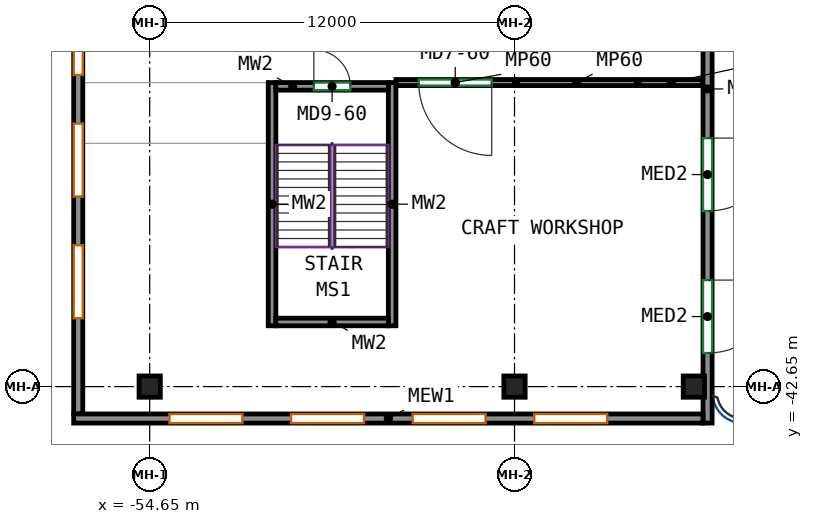
"""IFC4 building model, lengths in metres.
Left out: names, types, materials, properties, quantities, classifications, styles, units other than length and angle.
Written with IfcOpenShell. Run it as: python <this file> out.ifc"""

import sys

from ifc_helpers import new_model, si_unit, direction, frame, frame_2d, origin, origin_2d, place, context, subcontext, project, spatial, rectangle, extrude, source, transform, mapped, element, fill, save


model = new_model("IFC4")
c1 = context("Model", 3, precision=1e-05, world=origin(), true_north=direction((0.0, 1.0)))
c2 = subcontext(c1, "Body", "Model", "MODEL_VIEW")
j1 = project(units=[si_unit("LENGTHUNIT", "METRE"), si_unit("PLANEANGLEUNIT", "RADIAN")], contexts=[c1])
p1 = place(None, origin())
s1 = spatial("IfcSite", under=j1, at=p1, CompositionType="ELEMENT")
p2 = place(p1, origin())
s2 = spatial("IfcBuilding", under=s1, at=p2, CompositionType="ELEMENT")
p3 = place(p2, frame((0.0, 0.0, 18.0)))
s3 = spatial("IfcBuildingStorey", under=s2, at=p3, CompositionType="ELEMENT", Elevation=18.0)
m1 = source(origin(), c2, "Body", "SweptSolid", [
    extrude(rectangle(XDim=0.7, YDim=0.7, at=origin_2d()), origin(), (0.0, 0.0, 1.0), 4.1),
])
for number, where, z_axis, x_axis in (
    (1, (-54.65, -42.65, 0.0), (0.0, 0.0, 1.0), (1.0, 0.0, 0.0)),
    (2, (-42.65, -42.65, 0.0), (0.0, 0.0, 1.0), (1.0, 0.0, 0.0)),
    (3, (-36.75, -42.65, 0.0), (0.0, 0.0, 1.0), (1.0, 0.0, 0.0)),
):
    element("IfcColumn", number, at=place(p3, frame(where, z_axis=z_axis, x_axis=x_axis)), inside=s3, PredefinedType="COLUMN", context=c2, shape_type="MappedRepresentation", body=[
        mapped(m1, transform((0.0, 0.0, 0.0))),
    ])
m2 = source(origin(), c2, "Body", "SweptSolid", [
    extrude(rectangle(XDim=8.0, YDim=0.25, at=frame_2d((4.0, 0.0))), origin(), (0.0, 0.0, 1.0), 4.1),
])
for number, where, z_axis, x_axis in (
    (4, (-50.625, -40.65, 0.0), (0.0, 0.0, 1.0), (0.0, 1.0, 0.0)),
    (5, (-46.675, -40.65, 0.0), (0.0, 0.0, 1.0), (0.0, 1.0, 0.0)),
):
    element("IfcWall", number, at=place(p3, frame(where, z_axis=z_axis, x_axis=x_axis)), inside=s3, PredefinedType="SHEAR", context=c2, shape_type="MappedRepresentation", body=[
        mapped(m2, transform((0.0, 0.0, 0.0))),
    ])
m3 = source(origin(), c2, "Body", "SweptSolid", [
    extrude(rectangle(XDim=3.7, YDim=0.25, at=frame_2d((1.85, 0.0))), origin(), (0.0, 0.0, 1.0), 4.1),
])
p4 = place(p3, frame((-50.5, -40.525, 0.0), z_axis=(0.0, 0.0, 1.0), x_axis=(1.0, 0.0, 0.0)))
e6 = element("IfcWall", 6, at=p4, inside=s3, PredefinedType="SHEAR", context=c2, shape_type="MappedRepresentation", body=[
    mapped(m3, transform((0.0, 0.0, 0.0))),
])
p5 = place(p3, frame((-50.5, -32.775, 0.0), z_axis=(0.0, 0.0, 1.0), x_axis=(1.0, 0.0, 0.0)))
e7 = element("IfcWall", 7, at=p5, inside=s3, PredefinedType="SHEAR", context=c2, shape_type="MappedRepresentation", body=[
    mapped(m3, transform((0.0, 0.0, 0.0))),
])
p6 = place(p5, frame((1.25, 0.0, 0.0)))
e8 = element("IfcOpeningElement", 8, at=p6, cuts=e7, PredefinedType="OPENING", context=c2, shape_type="SweptSolid", body=[
    extrude(rectangle(XDim=1.2, YDim=2.1, at=frame_2d((0.6, 1.05))), frame((0.0, 0.135, 0.0), z_axis=(0.0, -1.0, 0.0), x_axis=(1.0, 0.0, 0.0)), (0.0, 0.0, 1.0), 0.27),
])
m4 = source(origin(), c2, "Body", "SweptSolid", [
    extrude(rectangle(XDim=100.7, YDim=0.3, at=frame_2d((50.35, 0.0))), origin(), (0.0, 0.0, 1.0), 4.1),
])
p7 = place(p3, frame((-57.0, -43.55, 0.0), z_axis=(0.0, 0.0, 1.0), x_axis=(0.0, 1.0, 0.0)))
e9 = element("IfcWall", 9, at=p7, inside=s3, PredefinedType="SOLIDWALL", context=c2, shape_type="MappedRepresentation", body=[
    mapped(m4, transform((0.0, 0.0, 0.0))),
])
p8 = place(p7, frame((3.15, 0.0, 0.9)))
e10 = element("IfcOpeningElement", 10, at=p8, cuts=e9, PredefinedType="OPENING", context=c2, shape_type="SweptSolid", body=[
    extrude(rectangle(XDim=2.4, YDim=1.8, at=frame_2d((1.2, 0.9))), frame((0.0, 0.16, 0.0), z_axis=(0.0, -1.0, 0.0), x_axis=(1.0, 0.0, 0.0)), (0.0, 0.0, 1.0), 0.32),
])
p9 = place(p7, frame((7.15, 0.0, 0.9)))
e11 = element("IfcOpeningElement", 11, at=p9, cuts=e9, PredefinedType="OPENING", context=c2, shape_type="SweptSolid", body=[
    extrude(rectangle(XDim=2.4, YDim=1.8, at=frame_2d((1.2, 0.9))), frame((0.0, 0.16, 0.0), z_axis=(0.0, -1.0, 0.0), x_axis=(1.0, 0.0, 0.0)), (0.0, 0.0, 1.0), 0.32),
])
p10 = place(p7, frame((11.15, 0.0, 0.9)))
e12 = element("IfcOpeningElement", 12, at=p10, cuts=e9, PredefinedType="OPENING", context=c2, shape_type="SweptSolid", body=[
    extrude(rectangle(XDim=2.4, YDim=1.8, at=frame_2d((1.2, 0.9))), frame((0.0, 0.16, 0.0), z_axis=(0.0, -1.0, 0.0), x_axis=(1.0, 0.0, 0.0)), (0.0, 0.0, 1.0), 0.32),
])
p11 = place(p7, frame((19.15, 0.0, 0.9)))
e13 = element("IfcOpeningElement", 13, at=p11, cuts=e9, PredefinedType="OPENING", context=c2, shape_type="SweptSolid", body=[
    extrude(rectangle(XDim=2.4, YDim=1.8, at=frame_2d((1.2, 0.9))), frame((0.0, 0.16, 0.0), z_axis=(0.0, -1.0, 0.0), x_axis=(1.0, 0.0, 0.0)), (0.0, 0.0, 1.0), 0.32),
])
p12 = place(p7, frame((23.15, 0.0, 0.9)))
e14 = element("IfcOpeningElement", 14, at=p12, cuts=e9, PredefinedType="OPENING", context=c2, shape_type="SweptSolid", body=[
    extrude(rectangle(XDim=2.4, YDim=1.8, at=frame_2d((1.2, 0.9))), frame((0.0, 0.16, 0.0), z_axis=(0.0, -1.0, 0.0), x_axis=(1.0, 0.0, 0.0)), (0.0, 0.0, 1.0), 0.32),
])
p13 = place(p7, frame((27.15, 0.0, 0.9)))
e15 = element("IfcOpeningElement", 15, at=p13, cuts=e9, PredefinedType="OPENING", context=c2, shape_type="SweptSolid", body=[
    extrude(rectangle(XDim=2.4, YDim=1.8, at=frame_2d((1.2, 0.9))), frame((0.0, 0.16, 0.0), z_axis=(0.0, -1.0, 0.0), x_axis=(1.0, 0.0, 0.0)), (0.0, 0.0, 1.0), 0.32),
])
p14 = place(p7, frame((31.15, 0.0, 0.9)))
e16 = element("IfcOpeningElement", 16, at=p14, cuts=e9, PredefinedType="OPENING", context=c2, shape_type="SweptSolid", body=[
    extrude(rectangle(XDim=2.4, YDim=1.8, at=frame_2d((1.2, 0.9))), frame((0.0, 0.16, 0.0), z_axis=(0.0, -1.0, 0.0), x_axis=(1.0, 0.0, 0.0)), (0.0, 0.0, 1.0), 0.32),
])
p15 = place(p7, frame((39.15, 0.0, 0.9)))
e17 = element("IfcOpeningElement", 17, at=p15, cuts=e9, PredefinedType="OPENING", context=c2, shape_type="SweptSolid", body=[
    extrude(rectangle(XDim=2.4, YDim=1.8, at=frame_2d((1.2, 0.9))), frame((0.0, 0.16, 0.0), z_axis=(0.0, -1.0, 0.0), x_axis=(1.0, 0.0, 0.0)), (0.0, 0.0, 1.0), 0.32),
])
p16 = place(p7, frame((43.15, 0.0, 0.9)))
e18 = element("IfcOpeningElement", 18, at=p16, cuts=e9, PredefinedType="OPENING", context=c2, shape_type="SweptSolid", body=[
    extrude(rectangle(XDim=2.4, YDim=1.8, at=frame_2d((1.2, 0.9))), frame((0.0, 0.16, 0.0), z_axis=(0.0, -1.0, 0.0), x_axis=(1.0, 0.0, 0.0)), (0.0, 0.0, 1.0), 0.32),
])
p17 = place(p7, frame((51.15, 0.0, 0.9)))
e19 = element("IfcOpeningElement", 19, at=p17, cuts=e9, PredefinedType="OPENING", context=c2, shape_type="SweptSolid", body=[
    extrude(rectangle(XDim=2.4, YDim=1.8, at=frame_2d((1.2, 0.9))), frame((0.0, 0.16, 0.0), z_axis=(0.0, -1.0, 0.0), x_axis=(1.0, 0.0, 0.0)), (0.0, 0.0, 1.0), 0.32),
])
p18 = place(p7, frame((55.15, 0.0, 0.9)))
e20 = element("IfcOpeningElement", 20, at=p18, cuts=e9, PredefinedType="OPENING", context=c2, shape_type="SweptSolid", body=[
    extrude(rectangle(XDim=2.4, YDim=1.8, at=frame_2d((1.2, 0.9))), frame((0.0, 0.16, 0.0), z_axis=(0.0, -1.0, 0.0), x_axis=(1.0, 0.0, 0.0)), (0.0, 0.0, 1.0), 0.32),
])
p19 = place(p7, frame((59.15, 0.0, 0.9)))
e21 = element("IfcOpeningElement", 21, at=p19, cuts=e9, PredefinedType="OPENING", context=c2, shape_type="SweptSolid", body=[
    extrude(rectangle(XDim=2.4, YDim=1.8, at=frame_2d((1.2, 0.9))), frame((0.0, 0.16, 0.0), z_axis=(0.0, -1.0, 0.0), x_axis=(1.0, 0.0, 0.0)), (0.0, 0.0, 1.0), 0.32),
])
p20 = place(p7, frame((63.15, 0.0, 0.9)))
e22 = element("IfcOpeningElement", 22, at=p20, cuts=e9, PredefinedType="OPENING", context=c2, shape_type="SweptSolid", body=[
    extrude(rectangle(XDim=2.4, YDim=1.8, at=frame_2d((1.2, 0.9))), frame((0.0, 0.16, 0.0), z_axis=(0.0, -1.0, 0.0), x_axis=(1.0, 0.0, 0.0)), (0.0, 0.0, 1.0), 0.32),
])
p21 = place(p7, frame((67.15, 0.0, 0.9)))
e23 = element("IfcOpeningElement", 23, at=p21, cuts=e9, PredefinedType="OPENING", context=c2, shape_type="SweptSolid", body=[
    extrude(rectangle(XDim=2.4, YDim=1.8, at=frame_2d((1.2, 0.9))), frame((0.0, 0.16, 0.0), z_axis=(0.0, -1.0, 0.0), x_axis=(1.0, 0.0, 0.0)), (0.0, 0.0, 1.0), 0.32),
])
p22 = place(p7, frame((75.15, 0.0, 0.9)))
e24 = element("IfcOpeningElement", 24, at=p22, cuts=e9, PredefinedType="OPENING", context=c2, shape_type="SweptSolid", body=[
    extrude(rectangle(XDim=2.4, YDim=1.8, at=frame_2d((1.2, 0.9))), frame((0.0, 0.16, 0.0), z_axis=(0.0, -1.0, 0.0), x_axis=(1.0, 0.0, 0.0)), (0.0, 0.0, 1.0), 0.32),
])
p23 = place(p7, frame((79.15, 0.0, 0.9)))
e25 = element("IfcOpeningElement", 25, at=p23, cuts=e9, PredefinedType="OPENING", context=c2, shape_type="SweptSolid", body=[
    extrude(rectangle(XDim=2.4, YDim=1.8, at=frame_2d((1.2, 0.9))), frame((0.0, 0.16, 0.0), z_axis=(0.0, -1.0, 0.0), x_axis=(1.0, 0.0, 0.0)), (0.0, 0.0, 1.0), 0.32),
])
p24 = place(p7, frame((83.15, 0.0, 0.9)))
e26 = element("IfcOpeningElement", 26, at=p24, cuts=e9, PredefinedType="OPENING", context=c2, shape_type="SweptSolid", body=[
    extrude(rectangle(XDim=2.4, YDim=1.8, at=frame_2d((1.2, 0.9))), frame((0.0, 0.16, 0.0), z_axis=(0.0, -1.0, 0.0), x_axis=(1.0, 0.0, 0.0)), (0.0, 0.0, 1.0), 0.32),
])
p25 = place(p7, frame((87.15, 0.0, 0.9)))
e27 = element("IfcOpeningElement", 27, at=p25, cuts=e9, PredefinedType="OPENING", context=c2, shape_type="SweptSolid", body=[
    extrude(rectangle(XDim=2.4, YDim=1.8, at=frame_2d((1.2, 0.9))), frame((0.0, 0.16, 0.0), z_axis=(0.0, -1.0, 0.0), x_axis=(1.0, 0.0, 0.0)), (0.0, 0.0, 1.0), 0.32),
])
p26 = place(p7, frame((91.15, 0.0, 0.9)))
e28 = element("IfcOpeningElement", 28, at=p26, cuts=e9, PredefinedType="OPENING", context=c2, shape_type="SweptSolid", body=[
    extrude(rectangle(XDim=2.4, YDim=1.8, at=frame_2d((1.2, 0.9))), frame((0.0, 0.16, 0.0), z_axis=(0.0, -1.0, 0.0), x_axis=(1.0, 0.0, 0.0)), (0.0, 0.0, 1.0), 0.32),
])
p27 = place(p7, frame((95.15, 0.0, 0.9)))
e29 = element("IfcOpeningElement", 29, at=p27, cuts=e9, PredefinedType="OPENING", context=c2, shape_type="SweptSolid", body=[
    extrude(rectangle(XDim=2.4, YDim=1.8, at=frame_2d((1.2, 0.9))), frame((0.0, 0.16, 0.0), z_axis=(0.0, -1.0, 0.0), x_axis=(1.0, 0.0, 0.0)), (0.0, 0.0, 1.0), 0.32),
])
m5 = source(origin(), c2, "Body", "SweptSolid", [
    extrude(rectangle(XDim=15.7, YDim=0.3, at=frame_2d((7.85, 0.0))), origin(), (0.0, 0.0, 1.0), 4.1),
])
p28 = place(p3, frame((-36.3, -28.15, 0.0), z_axis=(0.0, 0.0, 1.0), x_axis=(0.0, -1.0, 0.0)))
e30 = element("IfcWall", 30, at=p28, inside=s3, PredefinedType="SOLIDWALL", context=c2, shape_type="MappedRepresentation", body=[
    mapped(m5, transform((0.0, 0.0, 0.0))),
])
p29 = place(p28, frame((6.326, 0.0, 0.0)))
e31 = element("IfcOpeningElement", 31, at=p29, cuts=e30, PredefinedType="OPENING", context=c2, shape_type="SweptSolid", body=[
    extrude(rectangle(XDim=2.4, YDim=2.4, at=frame_2d((1.2, 1.2))), frame((0.0, 0.16, 0.0), z_axis=(0.0, -1.0, 0.0), x_axis=(1.0, 0.0, 0.0)), (0.0, 0.0, 1.0), 0.32),
])
p30 = place(p28, frame((10.997, 0.0, 0.0)))
e32 = element("IfcOpeningElement", 32, at=p30, cuts=e30, PredefinedType="OPENING", context=c2, shape_type="SweptSolid", body=[
    extrude(rectangle(XDim=2.4, YDim=2.4, at=frame_2d((1.2, 1.2))), frame((0.0, 0.16, 0.0), z_axis=(0.0, -1.0, 0.0), x_axis=(1.0, 0.0, 0.0)), (0.0, 0.0, 1.0), 0.32),
])
m6 = source(origin(), c2, "Body", "SweptSolid", [
    extrude(rectangle(XDim=20.7, YDim=0.3, at=frame_2d((10.35, 0.0))), origin(), (0.0, 0.0, 1.0), 4.1),
])
p31 = place(p3, frame((-36.45, -43.7, 0.0), z_axis=(0.0, 0.0, 1.0), x_axis=(-1.0, 0.0, 0.0)))
e33 = element("IfcWall", 33, at=p31, inside=s3, PredefinedType="SOLIDWALL", context=c2, shape_type="MappedRepresentation", body=[
    mapped(m6, transform((0.0, 0.0, 0.0))),
])
p32 = place(p31, frame((3.15, 0.0, 0.9)))
e34 = element("IfcOpeningElement", 34, at=p32, cuts=e33, PredefinedType="OPENING", context=c2, shape_type="SweptSolid", body=[
    extrude(rectangle(XDim=2.4, YDim=1.8, at=frame_2d((1.2, 0.9))), frame((0.0, 0.16, 0.0), z_axis=(0.0, -1.0, 0.0), x_axis=(1.0, 0.0, 0.0)), (0.0, 0.0, 1.0), 0.32),
])
p33 = place(p31, frame((7.15, 0.0, 0.9)))
e35 = element("IfcOpeningElement", 35, at=p33, cuts=e33, PredefinedType="OPENING", context=c2, shape_type="SweptSolid", body=[
    extrude(rectangle(XDim=2.4, YDim=1.8, at=frame_2d((1.2, 0.9))), frame((0.0, 0.16, 0.0), z_axis=(0.0, -1.0, 0.0), x_axis=(1.0, 0.0, 0.0)), (0.0, 0.0, 1.0), 0.32),
])
p34 = place(p31, frame((11.15, 0.0, 0.9)))
e36 = element("IfcOpeningElement", 36, at=p34, cuts=e33, PredefinedType="OPENING", context=c2, shape_type="SweptSolid", body=[
    extrude(rectangle(XDim=2.4, YDim=1.8, at=frame_2d((1.2, 0.9))), frame((0.0, 0.16, 0.0), z_axis=(0.0, -1.0, 0.0), x_axis=(1.0, 0.0, 0.0)), (0.0, 0.0, 1.0), 0.32),
])
p35 = place(p31, frame((15.15, 0.0, 0.9)))
e37 = element("IfcOpeningElement", 37, at=p35, cuts=e33, PredefinedType="OPENING", context=c2, shape_type="SweptSolid", body=[
    extrude(rectangle(XDim=2.4, YDim=1.8, at=frame_2d((1.2, 0.9))), frame((0.0, 0.16, 0.0), z_axis=(0.0, -1.0, 0.0), x_axis=(1.0, 0.0, 0.0)), (0.0, 0.0, 1.0), 0.32),
])
m7 = source(origin(), c2, "Body", "SweptSolid", [
    extrude(rectangle(XDim=3.9, YDim=0.2, at=frame_2d((1.95, 0.0))), origin(), (0.0, 0.0, 1.0), 3.3),
])
p36 = place(p3, frame((-42.65, -32.65, 0.0), z_axis=(0.0, 0.0, 1.0), x_axis=(-1.0, 0.0, 0.0)))
e38 = element("IfcWall", 38, at=p36, inside=s3, PredefinedType="PARTITIONING", context=c2, shape_type="MappedRepresentation", body=[
    mapped(m7, transform((0.0, 0.0, 0.0))),
])
p37 = place(p36, frame((0.75, 0.0, 0.0)))
e39 = element("IfcOpeningElement", 39, at=p37, cuts=e38, PredefinedType="OPENING", context=c2, shape_type="SweptSolid", body=[
    extrude(rectangle(XDim=2.4, YDim=2.4, at=frame_2d((1.2, 1.2))), frame((0.0, 0.11, 0.0), z_axis=(0.0, -1.0, 0.0), x_axis=(1.0, 0.0, 0.0)), (0.0, 0.0, 1.0), 0.22),
])
p38 = place(p3, frame((-38.65, -32.65, 0.0), z_axis=(0.0, 0.0, 1.0), x_axis=(-1.0, 0.0, 0.0)))
e40 = element("IfcWall", 40, at=p38, inside=s3, PredefinedType="PARTITIONING", context=c2, shape_type="MappedRepresentation", body=[
    mapped(m7, transform((0.0, 0.0, 0.0))),
])
m8 = source(origin(), c2, "Body", "SweptSolid", [
    extrude(rectangle(XDim=2.1, YDim=0.2, at=frame_2d((1.05, 0.0))), origin(), (0.0, 0.0, 1.0), 3.5),
])
p39 = place(p3, frame((-36.45, -32.65, 0.0), z_axis=(0.0, 0.0, 1.0), x_axis=(-1.0, 0.0, 0.0)))
e41 = element("IfcWall", 41, at=p39, inside=s3, PredefinedType="PARTITIONING", context=c2, shape_type="MappedRepresentation", body=[
    mapped(m8, transform((0.0, 0.0, 0.0))),
])
p40 = place(p29, origin())
e42 = element("IfcDoor", 42, at=p40, inside=s3, OperationType="DOUBLE_DOOR_SINGLE_SWING", PredefinedType="DOOR", context=c2, shape_type="SweptSolid", body=[
    extrude(rectangle(XDim=2.4, YDim=2.4, at=frame_2d((1.2, 1.2))), frame((0.0, 0.025, 0.0), z_axis=(0.0, -1.0, 0.0), x_axis=(1.0, 0.0, 0.0)), (0.0, 0.0, 1.0), 0.05),
])
fill(e31, e42)
p41 = place(p30, origin())
e43 = element("IfcDoor", 43, at=p41, inside=s3, OperationType="DOUBLE_DOOR_SINGLE_SWING", PredefinedType="DOOR", context=c2, shape_type="SweptSolid", body=[
    extrude(rectangle(XDim=2.4, YDim=2.4, at=frame_2d((1.2, 1.2))), frame((0.0, 0.025, 0.0), z_axis=(0.0, -1.0, 0.0), x_axis=(1.0, 0.0, 0.0)), (0.0, 0.0, 1.0), 0.05),
])
fill(e32, e43)
p42 = place(p8, origin())
e44 = element("IfcWindow", 44, at=p42, inside=s3, PartitioningType="SINGLE_PANEL", PredefinedType="WINDOW", context=c2, shape_type="SweptSolid", body=[
    extrude(rectangle(XDim=2.4, YDim=1.8, at=frame_2d((1.2, 0.9))), frame((0.0, 0.03, 0.0), z_axis=(0.0, -1.0, 0.0), x_axis=(1.0, 0.0, 0.0)), (0.0, 0.0, 1.0), 0.06),
])
fill(e10, e44)
p43 = place(p9, origin())
e45 = element("IfcWindow", 45, at=p43, inside=s3, PartitioningType="SINGLE_PANEL", PredefinedType="WINDOW", context=c2, shape_type="SweptSolid", body=[
    extrude(rectangle(XDim=2.4, YDim=1.8, at=frame_2d((1.2, 0.9))), frame((0.0, 0.03, 0.0), z_axis=(0.0, -1.0, 0.0), x_axis=(1.0, 0.0, 0.0)), (0.0, 0.0, 1.0), 0.06),
])
fill(e11, e45)
p44 = place(p10, origin())
e46 = element("IfcWindow", 46, at=p44, inside=s3, PartitioningType="SINGLE_PANEL", PredefinedType="WINDOW", context=c2, shape_type="SweptSolid", body=[
    extrude(rectangle(XDim=2.4, YDim=1.8, at=frame_2d((1.2, 0.9))), frame((0.0, 0.03, 0.0), z_axis=(0.0, -1.0, 0.0), x_axis=(1.0, 0.0, 0.0)), (0.0, 0.0, 1.0), 0.06),
])
fill(e12, e46)
p45 = place(p32, origin())
e47 = element("IfcWindow", 47, at=p45, inside=s3, PartitioningType="SINGLE_PANEL", PredefinedType="WINDOW", context=c2, shape_type="SweptSolid", body=[
    extrude(rectangle(XDim=2.4, YDim=1.8, at=frame_2d((1.2, 0.9))), frame((0.0, 0.03, 0.0), z_axis=(0.0, -1.0, 0.0), x_axis=(1.0, 0.0, 0.0)), (0.0, 0.0, 1.0), 0.06),
])
fill(e34, e47)
p46 = place(p33, origin())
e48 = element("IfcWindow", 48, at=p46, inside=s3, PartitioningType="SINGLE_PANEL", PredefinedType="WINDOW", context=c2, shape_type="SweptSolid", body=[
    extrude(rectangle(XDim=2.4, YDim=1.8, at=frame_2d((1.2, 0.9))), frame((0.0, 0.03, 0.0), z_axis=(0.0, -1.0, 0.0), x_axis=(1.0, 0.0, 0.0)), (0.0, 0.0, 1.0), 0.06),
])
fill(e35, e48)
p47 = place(p34, origin())
e49 = element("IfcWindow", 49, at=p47, inside=s3, PartitioningType="SINGLE_PANEL", PredefinedType="WINDOW", context=c2, shape_type="SweptSolid", body=[
    extrude(rectangle(XDim=2.4, YDim=1.8, at=frame_2d((1.2, 0.9))), frame((0.0, 0.03, 0.0), z_axis=(0.0, -1.0, 0.0), x_axis=(1.0, 0.0, 0.0)), (0.0, 0.0, 1.0), 0.06),
])
fill(e36, e49)
p48 = place(p35, origin())
e50 = element("IfcWindow", 50, at=p48, inside=s3, PartitioningType="SINGLE_PANEL", PredefinedType="WINDOW", context=c2, shape_type="SweptSolid", body=[
    extrude(rectangle(XDim=2.4, YDim=1.8, at=frame_2d((1.2, 0.9))), frame((0.0, 0.03, 0.0), z_axis=(0.0, -1.0, 0.0), x_axis=(1.0, 0.0, 0.0)), (0.0, 0.0, 1.0), 0.06),
])
fill(e37, e50)
p49 = place(p6, origin())
e51 = element("IfcDoor", 51, at=p49, inside=s3, OperationType="DOUBLE_DOOR_SINGLE_SWING", PredefinedType="DOOR", context=c2, shape_type="SweptSolid", body=[
    extrude(rectangle(XDim=1.2, YDim=2.1, at=frame_2d((0.6, 1.05))), frame((0.0, 0.025, 0.0), z_axis=(0.0, -1.0, 0.0), x_axis=(1.0, 0.0, 0.0)), (0.0, 0.0, 1.0), 0.05),
])
fill(e8, e51)
p50 = place(p37, origin())
e52 = element("IfcDoor", 52, at=p50, inside=s3, OperationType="DOUBLE_DOOR_SINGLE_SWING", PredefinedType="DOOR", context=c2, shape_type="SweptSolid", body=[
    extrude(rectangle(XDim=2.4, YDim=2.4, at=frame_2d((1.2, 1.2))), frame((0.0, 0.025, 0.0), z_axis=(0.0, -1.0, 0.0), x_axis=(1.0, 0.0, 0.0)), (0.0, 0.0, 1.0), 0.05),
])
fill(e39, e52)
save(model, sys.argv[1])
